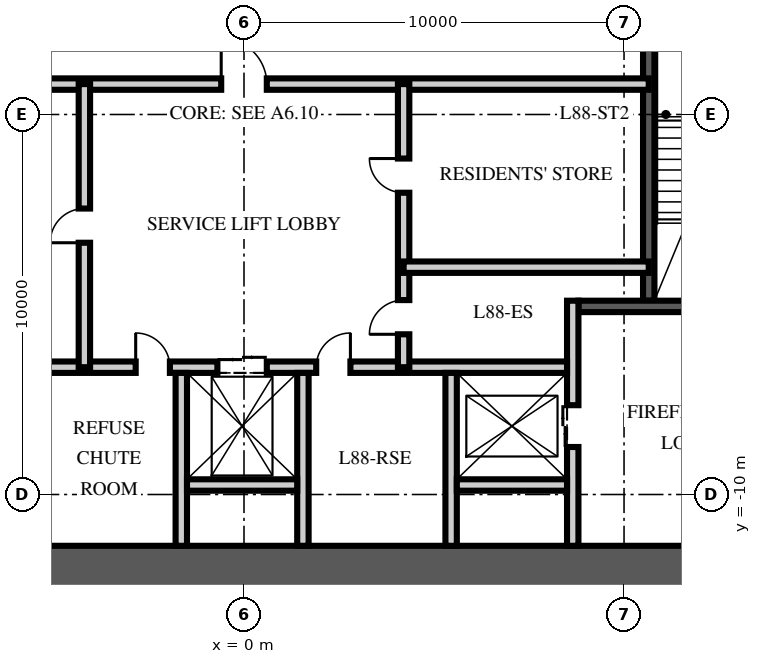
"""IFC4 building model, lengths in metres.
Left out: names, types, materials, properties, quantities, classifications, styles, units other than length and angle.
Written with IfcOpenShell. Run it as: python <this file> out.ifc"""

import sys

from ifc_helpers import new_model, si_unit, direction, frame, frame_2d, origin, place, context, subcontext, project, spatial, rectangle, extrude, element, fill, save


model = new_model("IFC4")
c1 = context("Model", 3, precision=1e-05, world=origin(), true_north=direction((0.0, 1.0)))
c2 = subcontext(c1, "Body", "Model", "MODEL_VIEW")
j1 = project(units=[si_unit("LENGTHUNIT", "METRE"), si_unit("PLANEANGLEUNIT", "RADIAN")], contexts=[c1])
p1 = place(None, origin())
s1 = spatial("IfcSite", under=j1, at=p1, CompositionType="ELEMENT")
p2 = place(p1, origin())
s2 = spatial("IfcBuilding", under=s1, at=p2, CompositionType="ELEMENT")
p3 = place(p2, frame((0.0, 0.0, 349.5)))
s3 = spatial("IfcBuildingStorey", under=s2, at=p3, CompositionType="ELEMENT", Elevation=349.5)
p4 = place(p3, frame((-15.5, -12.0, -0.25), z_axis=(0.0, 0.0, 1.0), x_axis=(1.0, 0.0, 0.0)))
e1 = element("IfcWall", 1, at=p4, inside=s3, PredefinedType="SHEAR", context=c2, shape_type="SweptSolid", body=[
    extrude(rectangle(XDim=31.0, YDim=1.3, at=frame_2d((15.5, 0.0))), origin(), (0.0, 0.0, 1.0), 3.7),
])
p5 = place(p3, frame((10.65, -4.9, 0.0), z_axis=(0.0, 0.0, 1.0), x_axis=(0.0, 1.0, 0.0)))
e2 = element("IfcWall", 2, at=p5, inside=s3, PredefinedType="SOLIDWALL", context=c2, shape_type="SweptSolid", body=[
    extrude(rectangle(XDim=10.1, YDim=0.3, at=frame_2d((5.05, 0.0))), origin(), (0.0, 0.0, 1.0), 3.45),
])
p6 = place(p3, frame((14.85, -5.05, 0.0), z_axis=(0.0, 0.0, 1.0), x_axis=(-1.0, 0.0, 0.0)))
e3 = element("IfcWall", 3, at=p6, inside=s3, PredefinedType="SOLIDWALL", context=c2, shape_type="SweptSolid", body=[
    extrude(rectangle(XDim=6.05, YDim=0.3, at=frame_2d((3.025, 0.0))), origin(), (0.0, 0.0, 1.0), 3.45),
])
p7 = place(p6, frame((1.425, 0.0, 0.0)))
e4 = element("IfcOpeningElement", 4, at=p7, cuts=e3, PredefinedType="OPENING", context=c2, shape_type="SweptSolid", body=[
    extrude(rectangle(XDim=1.2, YDim=2.1, at=frame_2d((0.6, 1.05))), frame((0.0, 0.16, 0.0), z_axis=(0.0, -1.0, 0.0), x_axis=(1.0, 0.0, 0.0)), (0.0, 0.0, 1.0), 0.32),
])
p8 = place(p3, frame((8.65, -11.35, 0.0), z_axis=(0.0, 0.0, 1.0), x_axis=(0.0, 1.0, 0.0)))
e5 = element("IfcWall", 5, at=p8, inside=s3, PredefinedType="PARTITIONING", context=c2, shape_type="SweptSolid", body=[
    extrude(rectangle(XDim=6.45, YDim=0.3, at=frame_2d((3.225, 0.0))), origin(), (0.0, 0.0, 1.0), 3.45),
])
p9 = place(p8, frame((2.6, 0.0, 0.0)))
e6 = element("IfcOpeningElement", 6, at=p9, cuts=e5, PredefinedType="OPENING", context=c2, shape_type="SweptSolid", body=[
    extrude(rectangle(XDim=1.1, YDim=2.1, at=frame_2d((0.55, 1.05))), frame((0.0, 0.16, 0.0), z_axis=(0.0, -1.0, 0.0), x_axis=(1.0, 0.0, 0.0)), (0.0, 0.0, 1.0), 0.32),
])
p10 = place(p3, frame((-8.5, -6.65, 0.0), z_axis=(0.0, 0.0, 1.0), x_axis=(1.0, 0.0, 0.0)))
e7 = element("IfcWall", 7, at=p10, inside=s3, PredefinedType="PARTITIONING", context=c2, shape_type="SweptSolid", body=[
    extrude(rectangle(XDim=17.0, YDim=0.3, at=frame_2d((8.5, 0.0))), origin(), (0.0, 0.0, 1.0), 3.45),
])
p11 = place(p10, frame((7.8, 0.0, 0.0)))
e8 = element("IfcOpeningElement", 8, at=p11, cuts=e7, PredefinedType="OPENING", context=c2, shape_type="SweptSolid", body=[
    extrude(rectangle(XDim=1.3, YDim=2.4, at=frame_2d((0.65, 1.2))), frame((0.0, 0.16, 0.0), z_axis=(0.0, -1.0, 0.0), x_axis=(1.0, 0.0, 0.0)), (0.0, 0.0, 1.0), 0.32),
])
p12 = place(p10, frame((5.65, 0.0, 0.0)))
e9 = element("IfcOpeningElement", 9, at=p12, cuts=e7, PredefinedType="OPENING", context=c2, shape_type="SweptSolid", body=[
    extrude(rectangle(XDim=0.9, YDim=2.1, at=frame_2d((0.45, 1.05))), frame((0.0, 0.16, 0.0), z_axis=(0.0, -1.0, 0.0), x_axis=(1.0, 0.0, 0.0)), (0.0, 0.0, 1.0), 0.32),
])
p13 = place(p10, frame((10.4, 0.0, 0.0)))
e10 = element("IfcOpeningElement", 10, at=p13, cuts=e7, PredefinedType="OPENING", context=c2, shape_type="SweptSolid", body=[
    extrude(rectangle(XDim=0.9, YDim=2.1, at=frame_2d((0.45, 1.05))), frame((0.0, 0.16, 0.0), z_axis=(0.0, -1.0, 0.0), x_axis=(1.0, 0.0, 0.0)), (0.0, 0.0, 1.0), 0.32),
])
for number, where, z_axis, x_axis in (
    (11, (-1.65, -11.35, 0.0), (0.0, 0.0, 1.0), (0.0, 1.0, 0.0)),
    (12, (1.55, -11.35, 0.0), (0.0, 0.0, 1.0), (0.0, 1.0, 0.0)),
    (13, (5.45, -11.35, 0.0), (0.0, 0.0, 1.0), (0.0, 1.0, 0.0)),
):
    element("IfcWall", number, at=place(p3, frame(where, z_axis=z_axis, x_axis=x_axis)), inside=s3, PredefinedType="PARTITIONING", context=c2, shape_type="SweptSolid", body=[
        extrude(rectangle(XDim=4.55, YDim=0.3, at=frame_2d((2.275, 0.0))), origin(), (0.0, 0.0, 1.0), 3.45),
    ])
for number, where, z_axis, x_axis in (
    (14, (-1.5, -9.75, 0.0), (0.0, 0.0, 1.0), (1.0, 0.0, 0.0)),
    (15, (5.6, -9.75, 0.0), (0.0, 0.0, 1.0), (1.0, 0.0, 0.0)),
):
    element("IfcWall", number, at=place(p3, frame(where, z_axis=z_axis, x_axis=x_axis)), inside=s3, PredefinedType="PARTITIONING", context=c2, shape_type="SweptSolid", body=[
        extrude(rectangle(XDim=2.9, YDim=0.3, at=frame_2d((1.45, 0.0))), origin(), (0.0, 0.0, 1.0), 3.45),
    ])
p14 = place(p3, frame((-10.65, 0.8, 0.0), z_axis=(0.0, 0.0, 1.0), x_axis=(1.0, 0.0, 0.0)))
e16 = element("IfcWall", 16, at=p14, inside=s3, PredefinedType="PARTITIONING", context=c2, shape_type="SweptSolid", body=[
    extrude(rectangle(XDim=21.3, YDim=0.3, at=frame_2d((10.65, 0.0))), origin(), (0.0, 0.0, 1.0), 3.45),
])
p15 = place(p14, frame((10.05, 0.0, 0.0)))
e17 = element("IfcOpeningElement", 17, at=p15, cuts=e16, PredefinedType="OPENING", context=c2, shape_type="SweptSolid", body=[
    extrude(rectangle(XDim=1.2, YDim=2.1, at=frame_2d((0.6, 1.05))), frame((0.0, 0.16, 0.0), z_axis=(0.0, -1.0, 0.0), x_axis=(1.0, 0.0, 0.0)), (0.0, 0.0, 1.0), 0.32),
])
p16 = place(p14, frame((0.793, 0.0, 0.0)))
e18 = element("IfcOpeningElement", 18, at=p16, cuts=e16, PredefinedType="OPENING", context=c2, shape_type="SweptSolid", body=[
    extrude(rectangle(XDim=0.9, YDim=2.1, at=frame_2d((0.45, 1.05))), frame((0.0, 0.16, 0.0), z_axis=(0.0, -1.0, 0.0), x_axis=(1.0, 0.0, 0.0)), (0.0, 0.0, 1.0), 0.32),
])
p17 = place(p3, frame((-4.2, -6.65, 0.0), z_axis=(0.0, 0.0, 1.0), x_axis=(0.0, 1.0, 0.0)))
e19 = element("IfcWall", 19, at=p17, inside=s3, PredefinedType="PARTITIONING", context=c2, shape_type="SweptSolid", body=[
    extrude(rectangle(XDim=7.45, YDim=0.3, at=frame_2d((3.725, 0.0))), origin(), (0.0, 0.0, 1.0), 3.45),
])
p18 = place(p17, frame((3.275, 0.0, 0.0)))
e20 = element("IfcOpeningElement", 20, at=p18, cuts=e19, PredefinedType="OPENING", context=c2, shape_type="SweptSolid", body=[
    extrude(rectangle(XDim=0.9, YDim=2.1, at=frame_2d((0.45, 1.05))), frame((0.0, 0.16, 0.0), z_axis=(0.0, -1.0, 0.0), x_axis=(1.0, 0.0, 0.0)), (0.0, 0.0, 1.0), 0.32),
])
p19 = place(p3, frame((4.2, -6.65, 0.0), z_axis=(0.0, 0.0, 1.0), x_axis=(0.0, 1.0, 0.0)))
e21 = element("IfcWall", 21, at=p19, inside=s3, PredefinedType="PARTITIONING", context=c2, shape_type="SweptSolid", body=[
    extrude(rectangle(XDim=7.45, YDim=0.3, at=frame_2d((3.725, 0.0))), origin(), (0.0, 0.0, 1.0), 3.45),
])
p20 = place(p19, frame((0.866, 0.0, 0.0)))
e22 = element("IfcOpeningElement", 22, at=p20, cuts=e21, PredefinedType="OPENING", context=c2, shape_type="SweptSolid", body=[
    extrude(rectangle(XDim=0.9, YDim=2.1, at=frame_2d((0.45, 1.05))), frame((0.0, 0.16, 0.0), z_axis=(0.0, -1.0, 0.0), x_axis=(1.0, 0.0, 0.0)), (0.0, 0.0, 1.0), 0.32),
])
p21 = place(p19, frame((4.591, 0.0, 0.0)))
e23 = element("IfcOpeningElement", 23, at=p21, cuts=e21, PredefinedType="OPENING", context=c2, shape_type="SweptSolid", body=[
    extrude(rectangle(XDim=0.9, YDim=2.1, at=frame_2d((0.45, 1.05))), frame((0.0, 0.16, 0.0), z_axis=(0.0, -1.0, 0.0), x_axis=(1.0, 0.0, 0.0)), (0.0, 0.0, 1.0), 0.32),
])
p22 = place(p3, frame((10.65, -4.018, 0.0), z_axis=(0.0, 0.0, 1.0), x_axis=(-1.0, 0.0, 0.0)))
e24 = element("IfcWall", 24, at=p22, inside=s3, PredefinedType="PARTITIONING", context=c2, shape_type="SweptSolid", body=[
    extrude(rectangle(XDim=6.45, YDim=0.3, at=frame_2d((3.225, 0.0))), origin(), (0.0, 0.0, 1.0), 3.45),
])
p23 = place(p9, origin())
e25 = element("IfcDoor", 25, at=p23, inside=s3, OperationType="DOUBLE_DOOR_SLIDING", PredefinedType="DOOR", context=c2, shape_type="SweptSolid", body=[
    extrude(rectangle(XDim=1.1, YDim=2.1, at=frame_2d((0.55, 1.05))), frame((0.0, 0.025, 0.0), z_axis=(0.0, -1.0, 0.0), x_axis=(1.0, 0.0, 0.0)), (0.0, 0.0, 1.0), 0.05),
])
fill(e6, e25)
p24 = place(p11, origin())
e26 = element("IfcDoor", 26, at=p24, inside=s3, OperationType="DOUBLE_DOOR_SLIDING", PredefinedType="DOOR", context=c2, shape_type="SweptSolid", body=[
    extrude(rectangle(XDim=1.3, YDim=2.4, at=frame_2d((0.65, 1.2))), frame((0.0, 0.025, 0.0), z_axis=(0.0, -1.0, 0.0), x_axis=(1.0, 0.0, 0.0)), (0.0, 0.0, 1.0), 0.05),
])
fill(e8, e26)
p25 = place(p15, origin())
e27 = element("IfcDoor", 27, at=p25, inside=s3, OperationType="SINGLE_SWING_LEFT", PredefinedType="DOOR", context=c2, shape_type="SweptSolid", body=[
    extrude(rectangle(XDim=1.2, YDim=2.1, at=frame_2d((0.6, 1.05))), frame((0.0, 0.025, 0.0), z_axis=(0.0, -1.0, 0.0), x_axis=(1.0, 0.0, 0.0)), (0.0, 0.0, 1.0), 0.05),
])
fill(e17, e27)
p26 = place(p12, origin())
e28 = element("IfcDoor", 28, at=p26, inside=s3, OperationType="SINGLE_SWING_LEFT", PredefinedType="DOOR", context=c2, shape_type="SweptSolid", body=[
    extrude(rectangle(XDim=0.9, YDim=2.1, at=frame_2d((0.45, 1.05))), frame((0.0, 0.025, 0.0), z_axis=(0.0, -1.0, 0.0), x_axis=(1.0, 0.0, 0.0)), (0.0, 0.0, 1.0), 0.05),
])
fill(e9, e28)
p27 = place(p13, origin())
e29 = element("IfcDoor", 29, at=p27, inside=s3, OperationType="SINGLE_SWING_RIGHT", PredefinedType="DOOR", context=c2, shape_type="SweptSolid", body=[
    extrude(rectangle(XDim=0.9, YDim=2.1, at=frame_2d((0.45, 1.05))), frame((0.0, 0.025, 0.0), z_axis=(0.0, -1.0, 0.0), x_axis=(1.0, 0.0, 0.0)), (0.0, 0.0, 1.0), 0.05),
])
fill(e10, e29)
p28 = place(p18, origin())
e30 = element("IfcDoor", 30, at=p28, inside=s3, OperationType="SINGLE_SWING_LEFT", PredefinedType="DOOR", context=c2, shape_type="SweptSolid", body=[
    extrude(rectangle(XDim=0.9, YDim=2.1, at=frame_2d((0.45, 1.05))), frame((0.0, 0.025, 0.0), z_axis=(0.0, -1.0, 0.0), x_axis=(1.0, 0.0, 0.0)), (0.0, 0.0, 1.0), 0.05),
])
fill(e20, e30)
p29 = place(p20, origin())
e31 = element("IfcDoor", 31, at=p29, inside=s3, OperationType="SINGLE_SWING_LEFT", PredefinedType="DOOR", context=c2, shape_type="SweptSolid", body=[
    extrude(rectangle(XDim=0.9, YDim=2.1, at=frame_2d((0.45, 1.05))), frame((0.0, 0.025, 0.0), z_axis=(0.0, -1.0, 0.0), x_axis=(1.0, 0.0, 0.0)), (0.0, 0.0, 1.0), 0.05),
])
fill(e22, e31)
p30 = place(p21, origin())
e32 = element("IfcDoor", 32, at=p30, inside=s3, OperationType="SINGLE_SWING_RIGHT", PredefinedType="DOOR", context=c2, shape_type="SweptSolid", body=[
    extrude(rectangle(XDim=0.9, YDim=2.1, at=frame_2d((0.45, 1.05))), frame((0.0, 0.025, 0.0), z_axis=(0.0, -1.0, 0.0), x_axis=(1.0, 0.0, 0.0)), (0.0, 0.0, 1.0), 0.05),
])
fill(e23, e32)
save(model, sys.argv[1])
